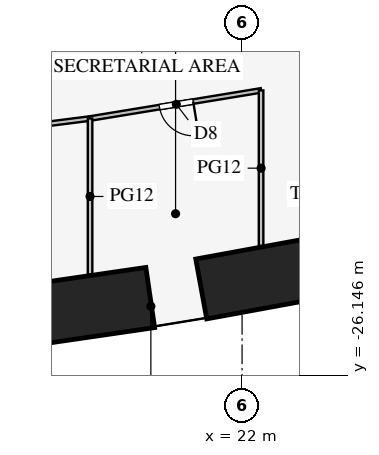
"""IFC4 building model, lengths in metres.
Left out: names, types, materials, properties, quantities, classifications, styles, units other than length and angle.
Written with IfcOpenShell. Run it as: python <this file> out.ifc"""

import sys

from ifc_helpers import new_model, si_unit, direction, frame, frame_2d, origin, origin_2d, place, context, subcontext, project, spatial, rectangle, extrude, element, fill, save


model = new_model("IFC4")
c1 = context("Model", 3, precision=1e-05, world=origin(), true_north=direction((0.0, 1.0)))
c2 = subcontext(c1, "Body", "Model", "MODEL_VIEW")
j1 = project(units=[si_unit("LENGTHUNIT", "METRE"), si_unit("PLANEANGLEUNIT", "RADIAN")], contexts=[c1])
p1 = place(None, origin())
s1 = spatial("IfcSite", under=j1, at=p1, CompositionType="ELEMENT")
p2 = place(p1, origin())
s2 = spatial("IfcBuilding", under=s1, at=p2, CompositionType="ELEMENT")
p3 = place(p2, frame((0.0, 0.0, 103.1)))
s3 = spatial("IfcBuildingStorey", under=s2, at=p3, CompositionType="ELEMENT", Elevation=103.1)
for number, where, z_axis, x_axis in (
    (1, (18.0, -24.337, 0.0), (0.0, 0.0, 1.0), (0.99, 0.144, 0.0)),
    (2, (22.5, -23.593, 0.0), (0.0, 0.0, 1.0), (0.984, 0.18, 0.0)),
):
    element("IfcColumn", number, at=place(p3, frame(where, z_axis=z_axis, x_axis=x_axis)), inside=s3, PredefinedType="COLUMN", context=c2, shape_type="SweptSolid", body=[
        extrude(rectangle(XDim=3.2, YDim=1.6, at=origin_2d()), origin(), (0.0, 0.0, 1.0), 4.2),
    ])
p4 = place(p3, frame((13.5, -19.968, 0.0), z_axis=(0.0, 0.0, 1.0), x_axis=(0.992010652594, 0.12615413247, 0.0)))
e3 = element("IfcWall", 3, at=p4, inside=s3, PredefinedType="PARTITIONING", context=c2, shape_type="SweptSolid", body=[
    extrude(rectangle(XDim=4.536, YDim=0.12, at=frame_2d((2.268, 0.0))), origin(), (0.0, 0.0, 1.0), 2.9),
])
p5 = place(p4, frame((1.8, 0.0, 0.15)))
e4 = element("IfcOpeningElement", 4, at=p5, cuts=e3, PredefinedType="OPENING", context=c2, shape_type="SweptSolid", body=[
    extrude(rectangle(XDim=0.9, YDim=2.1, at=frame_2d((0.45, 1.05))), frame((0.0, 0.07, 0.0), z_axis=(0.0, -1.0, 0.0), x_axis=(1.0, 0.0, 0.0)), (0.0, 0.0, 1.0), 0.14),
])
p6 = place(p3, frame((18.0, -19.396, 0.0), z_axis=(0.0, 0.0, 1.0), x_axis=(0.986764681833, 0.162158757664, 0.0)))
e5 = element("IfcWall", 5, at=p6, inside=s3, PredefinedType="PARTITIONING", context=c2, shape_type="SweptSolid", body=[
    extrude(rectangle(XDim=4.56, YDim=0.12, at=frame_2d((2.28, 0.0))), origin(), (0.0, 0.0, 1.0), 2.9),
])
p7 = place(p6, frame((1.85, 0.0, 0.15)))
e6 = element("IfcOpeningElement", 6, at=p7, cuts=e5, PredefinedType="OPENING", context=c2, shape_type="SweptSolid", body=[
    extrude(rectangle(XDim=0.9, YDim=2.1, at=frame_2d((0.45, 1.05))), frame((0.0, 0.07, 0.0), z_axis=(0.0, -1.0, 0.0), x_axis=(1.0, 0.0, 0.0)), (0.0, 0.0, 1.0), 0.14),
])
p8 = place(p3, frame((18.0, -19.396, 0.0), z_axis=(0.0, 0.0, 1.0), x_axis=(0.0, -1.0, 0.0)))
e7 = element("IfcWall", 7, at=p8, inside=s3, PredefinedType="PARTITIONING", context=c2, shape_type="SweptSolid", body=[
    extrude(rectangle(XDim=4.103, YDim=0.12, at=frame_2d((2.052, 0.0))), origin(), (0.0, 0.0, 1.0), 2.4),
])
p9 = place(p3, frame((22.5, -18.656, 0.0), z_axis=(0.0, 0.0, 1.0), x_axis=(0.0, -1.0, 0.0)))
e8 = element("IfcWall", 8, at=p9, inside=s3, PredefinedType="PARTITIONING", context=c2, shape_type="SweptSolid", body=[
    extrude(rectangle(XDim=4.093, YDim=0.12, at=frame_2d((2.046, 0.0))), origin(), (0.0, 0.0, 1.0), 2.6),
])
p10 = place(p7, frame((0.9, 0.0, 0.0), z_axis=(0.0, 0.0, 1.0), x_axis=(-1.0, 0.0, 0.0)))
e9 = element("IfcDoor", 9, at=p10, inside=s3, OperationType="SINGLE_SWING_LEFT", PredefinedType="DOOR", context=c2, shape_type="SweptSolid", body=[
    extrude(rectangle(XDim=0.9, YDim=2.1, at=frame_2d((0.45, 1.05))), frame((0.0, 0.025, 0.0), z_axis=(0.0, -1.0, 0.0), x_axis=(1.0, 0.0, 0.0)), (0.0, 0.0, 1.0), 0.05),
])
fill(e6, e9)
save(model, sys.argv[1])
